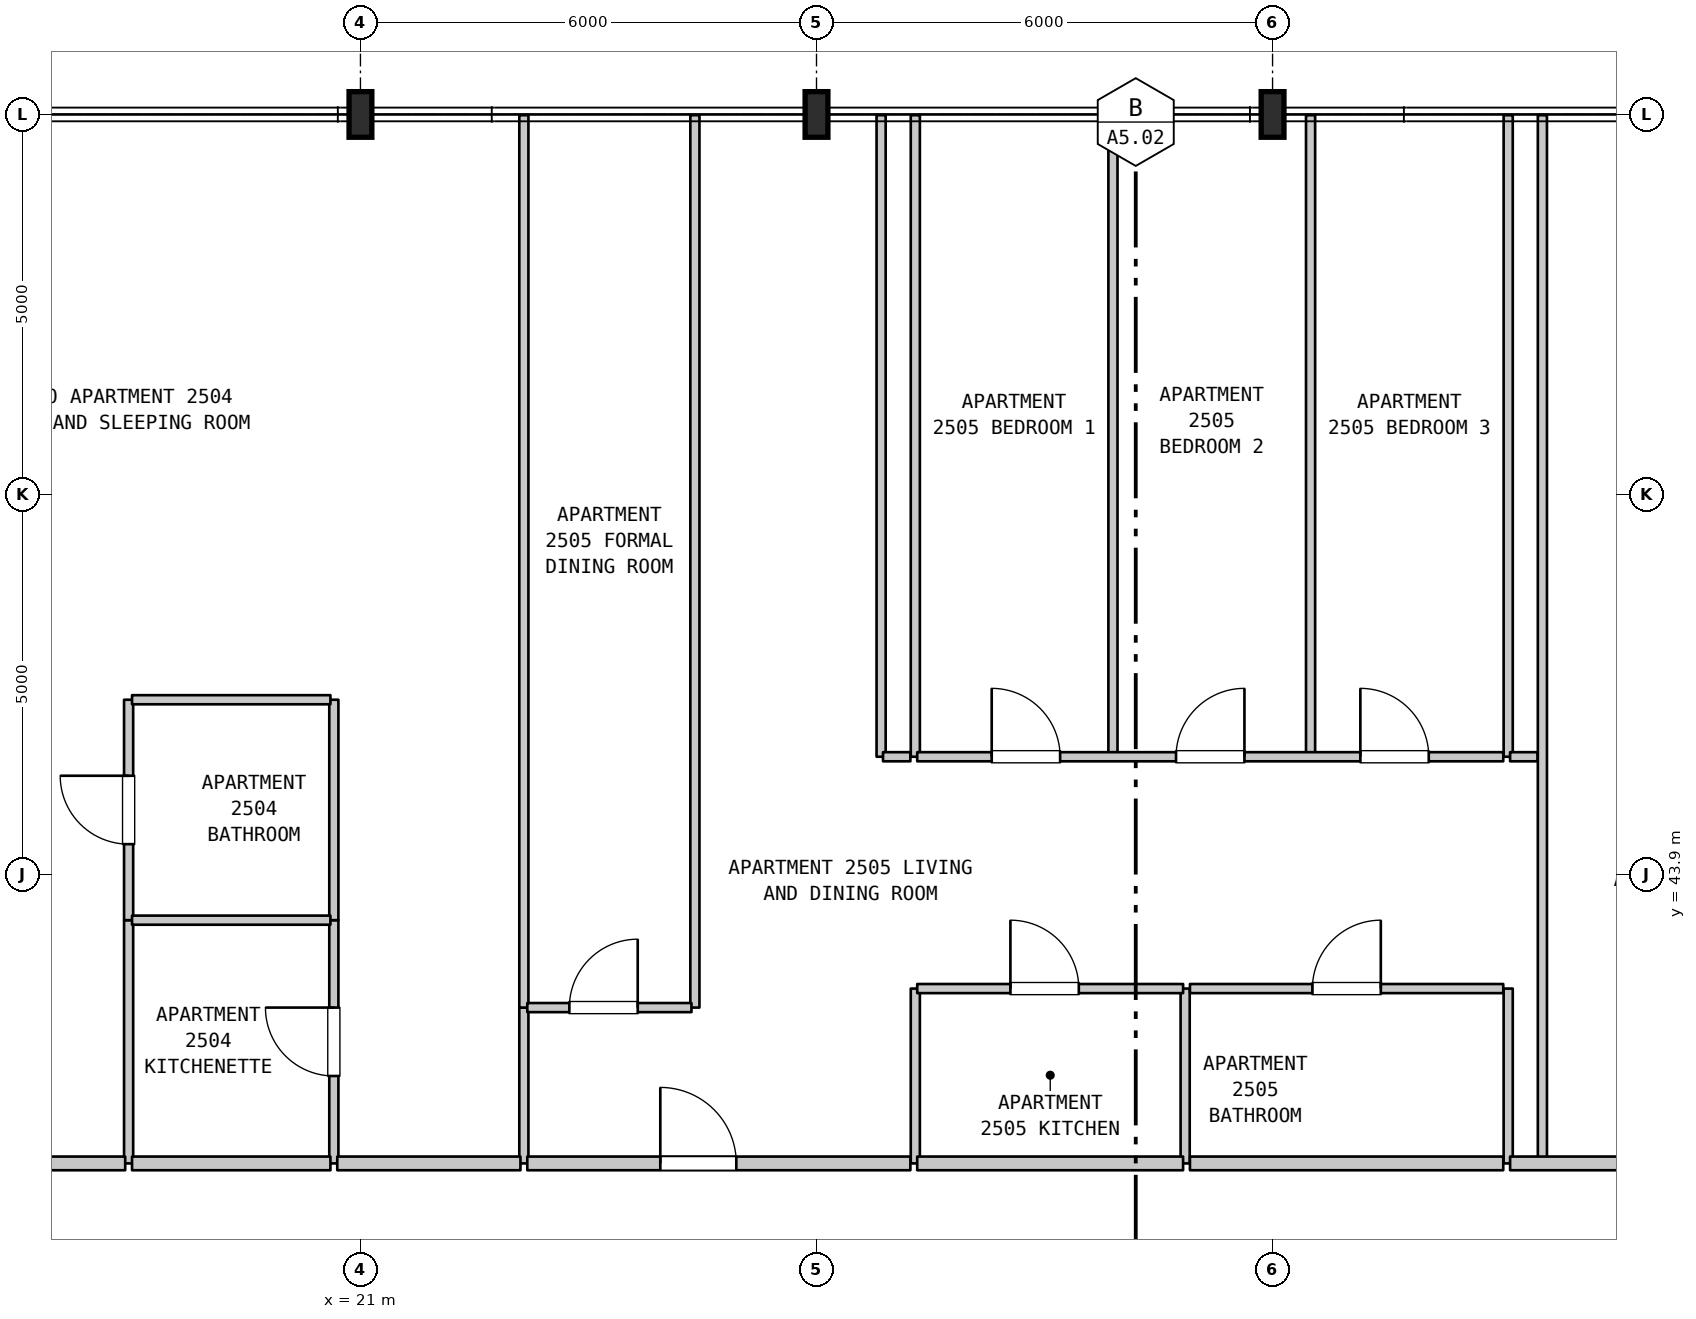
"""IFC4 building model, lengths in metres.
Left out: names, types, materials, properties, quantities, classifications, styles, units other than length and angle.
Written with IfcOpenShell. Run it as: python <this file> out.ifc"""

import sys

from ifc_helpers import new_model, si_unit, direction, frame, frame_2d, origin, origin_2d, place, context, subcontext, project, spatial, rectangle, i_section, extrude, element, fill, save


model = new_model("IFC4")
c1 = context("Model", 3, precision=1e-05, world=origin(), true_north=direction((0.0, 1.0)))
c2 = subcontext(c1, "Body", "Model", "MODEL_VIEW")
j1 = project(units=[si_unit("LENGTHUNIT", "METRE"), si_unit("PLANEANGLEUNIT", "RADIAN")], contexts=[c1])
p1 = place(None, origin())
s1 = spatial("IfcSite", under=j1, at=p1, CompositionType="ELEMENT")
p2 = place(p1, origin())
s2 = spatial("IfcBuilding", under=s1, at=p2, CompositionType="ELEMENT")
p3 = place(p2, frame((0.0, 0.0, 105.7)))
s3 = spatial("IfcBuildingStorey", under=s2, at=p3, CompositionType="ELEMENT", Elevation=105.7)
for number, where, z_axis, x_axis in (
    (1, (21.0, 53.9, 0.0), (0.0, 0.0, 1.0), (1.0, 0.0, 0.0)),
    (2, (27.0, 53.9, 0.0), (0.0, 0.0, 1.0), (1.0, 0.0, 0.0)),
    (3, (33.0, 53.9, 0.0), (0.0, 0.0, 1.0), (1.0, 0.0, 0.0)),
):
    element("IfcColumn", number, at=place(p3, frame(where, z_axis=z_axis, x_axis=x_axis)), inside=s3, PredefinedType="COLUMN", context=c2, shape_type="SweptSolid", body=[
        extrude(i_section(OverallWidth=0.3, OverallDepth=0.6, WebThickness=0.015, FlangeThickness=0.03, FilletRadius=0.027, at=origin_2d()), origin(), (0.0, 0.0, 1.0), 3.7),
    ])
p4 = place(p3, frame((17.95, 40.1, 0.0), z_axis=(0.0, 0.0, 1.0), x_axis=(0.0, 1.0, 0.0)))
e4 = element("IfcWall", 4, at=p4, inside=s3, PredefinedType="PARTITIONING", context=c2, shape_type="SweptSolid", body=[
    extrude(rectangle(XDim=3.2, YDim=0.12, at=frame_2d((1.6, 0.0))), origin(), (0.0, 0.0, 1.0), 3.385),
])
p5 = place(p3, frame((17.95, 43.3, 0.0), z_axis=(0.0, 0.0, 1.0), x_axis=(0.0, 1.0, 0.0)))
e5 = element("IfcWall", 5, at=p5, inside=s3, PredefinedType="PARTITIONING", context=c2, shape_type="SweptSolid", body=[
    extrude(rectangle(XDim=2.9, YDim=0.12, at=frame_2d((1.45, 0.0))), origin(), (0.0, 0.0, 1.0), 3.385),
])
p6 = place(p5, frame((1.0, 0.0, 0.0)))
e6 = element("IfcOpeningElement", 6, at=p6, cuts=e5, PredefinedType="OPENING", context=c2, shape_type="SweptSolid", body=[
    extrude(rectangle(XDim=0.9, YDim=2.1, at=frame_2d((0.45, 1.05))), frame((0.0, 0.07, 0.0), z_axis=(0.0, -1.0, 0.0), x_axis=(1.0, 0.0, 0.0)), (0.0, 0.0, 1.0), 0.14),
])
p7 = place(p3, frame((20.65, 40.1, 0.0), z_axis=(0.0, 0.0, 1.0), x_axis=(0.0, 1.0, 0.0)))
e7 = element("IfcWall", 7, at=p7, inside=s3, PredefinedType="PARTITIONING", context=c2, shape_type="SweptSolid", body=[
    extrude(rectangle(XDim=3.2, YDim=0.12, at=frame_2d((1.6, 0.0))), origin(), (0.0, 0.0, 1.0), 3.385),
])
p8 = place(p7, frame((1.15, 0.0, 0.0)))
e8 = element("IfcOpeningElement", 8, at=p8, cuts=e7, PredefinedType="OPENING", context=c2, shape_type="SweptSolid", body=[
    extrude(rectangle(XDim=0.9, YDim=2.15, at=frame_2d((0.45, 1.075))), frame((0.0, 0.07, 0.0), z_axis=(0.0, -1.0, 0.0), x_axis=(1.0, 0.0, 0.0)), (0.0, 0.0, 1.0), 0.14),
])
p9 = place(p3, frame((20.65, 43.3, 0.0), z_axis=(0.0, 0.0, 1.0), x_axis=(0.0, 1.0, 0.0)))
e9 = element("IfcWall", 9, at=p9, inside=s3, PredefinedType="PARTITIONING", context=c2, shape_type="SweptSolid", body=[
    extrude(rectangle(XDim=2.9, YDim=0.12, at=frame_2d((1.45, 0.0))), origin(), (0.0, 0.0, 1.0), 3.385),
])
p10 = place(p3, frame((23.15, 40.1, 0.0), z_axis=(0.0, 0.0, 1.0), x_axis=(0.0, 1.0, 0.0)))
e10 = element("IfcWall", 10, at=p10, inside=s3, PredefinedType="PARTITIONING", context=c2, shape_type="SweptSolid", body=[
    extrude(rectangle(XDim=2.05, YDim=0.12, at=frame_2d((1.025, 0.0))), origin(), (0.0, 0.0, 1.0), 3.385),
])
for number, where, z_axis, x_axis in (
    (11, (23.15, 42.15, 0.0), (0.0, 0.0, 1.0), (0.0, 1.0, 0.0)),
    (12, (25.4, 42.15, 0.0), (0.0, 0.0, 1.0), (0.0, 1.0, 0.0)),
):
    element("IfcWall", number, at=place(p3, frame(where, z_axis=z_axis, x_axis=x_axis)), inside=s3, PredefinedType="PARTITIONING", context=c2, shape_type="SweptSolid", body=[
        extrude(rectangle(XDim=11.74, YDim=0.12, at=frame_2d((5.87, 0.0))), origin(), (0.0, 0.0, 1.0), 3.385),
    ])
p11 = place(p3, frame((27.85, 45.45, 0.0), z_axis=(0.0, 0.0, 1.0), x_axis=(0.0, 1.0, 0.0)))
e13 = element("IfcWall", 13, at=p11, inside=s3, PredefinedType="PARTITIONING", context=c2, shape_type="SweptSolid", body=[
    extrude(rectangle(XDim=8.44, YDim=0.12, at=frame_2d((4.22, 0.0))), origin(), (0.0, 0.0, 1.0), 3.385),
])
p12 = place(p3, frame((28.3, 40.1, 0.0), z_axis=(0.0, 0.0, 1.0), x_axis=(0.0, 1.0, 0.0)))
e14 = element("IfcWall", 14, at=p12, inside=s3, PredefinedType="PARTITIONING", context=c2, shape_type="SweptSolid", body=[
    extrude(rectangle(XDim=2.3, YDim=0.12, at=frame_2d((1.15, 0.0))), origin(), (0.0, 0.0, 1.0), 3.385),
])
for number, where, z_axis, x_axis in (
    (15, (28.3, 45.45, 0.0), (0.0, 0.0, 1.0), (0.0, 1.0, 0.0)),
    (16, (30.9, 45.45, 0.0), (0.0, 0.0, 1.0), (0.0, 1.0, 0.0)),
):
    element("IfcWall", number, at=place(p3, frame(where, z_axis=z_axis, x_axis=x_axis)), inside=s3, PredefinedType="PARTITIONING", context=c2, shape_type="SweptSolid", body=[
        extrude(rectangle(XDim=8.44, YDim=0.12, at=frame_2d((4.22, 0.0))), origin(), (0.0, 0.0, 1.0), 3.385),
    ])
p13 = place(p3, frame((31.85, 40.1, 0.0), z_axis=(0.0, 0.0, 1.0), x_axis=(0.0, 1.0, 0.0)))
e17 = element("IfcWall", 17, at=p13, inside=s3, PredefinedType="PARTITIONING", context=c2, shape_type="SweptSolid", body=[
    extrude(rectangle(XDim=2.3, YDim=0.12, at=frame_2d((1.15, 0.0))), origin(), (0.0, 0.0, 1.0), 3.385),
])
p14 = place(p3, frame((33.5, 45.45, 0.0), z_axis=(0.0, 0.0, 1.0), x_axis=(0.0, 1.0, 0.0)))
e18 = element("IfcWall", 18, at=p14, inside=s3, PredefinedType="PARTITIONING", context=c2, shape_type="SweptSolid", body=[
    extrude(rectangle(XDim=8.44, YDim=0.12, at=frame_2d((4.22, 0.0))), origin(), (0.0, 0.0, 1.0), 3.385),
])
p15 = place(p3, frame((36.1, 40.1, 0.0), z_axis=(0.0, 0.0, 1.0), x_axis=(0.0, 1.0, 0.0)))
e19 = element("IfcWall", 19, at=p15, inside=s3, PredefinedType="PARTITIONING", context=c2, shape_type="SweptSolid", body=[
    extrude(rectangle(XDim=2.3, YDim=0.12, at=frame_2d((1.15, 0.0))), origin(), (0.0, 0.0, 1.0), 3.385),
])
p16 = place(p3, frame((36.1, 45.45, 0.0), z_axis=(0.0, 0.0, 1.0), x_axis=(0.0, 1.0, 0.0)))
e20 = element("IfcWall", 20, at=p16, inside=s3, PredefinedType="PARTITIONING", context=c2, shape_type="SweptSolid", body=[
    extrude(rectangle(XDim=8.44, YDim=0.12, at=frame_2d((4.22, 0.0))), origin(), (0.0, 0.0, 1.0), 3.385),
])
p17 = place(p3, frame((36.55, 40.1, 0.0), z_axis=(0.0, 0.0, 1.0), x_axis=(0.0, 1.0, 0.0)))
e21 = element("IfcWall", 21, at=p17, inside=s3, PredefinedType="PARTITIONING", context=c2, shape_type="SweptSolid", body=[
    extrude(rectangle(XDim=13.79, YDim=0.12, at=frame_2d((6.895, 0.0))), origin(), (0.0, 0.0, 1.0), 3.385),
])
p18 = place(p3, frame((12.875, 40.1, 0.0), z_axis=(0.0, 0.0, 1.0), x_axis=(1.0, 0.0, 0.0)))
e22 = element("IfcWall", 22, at=p18, inside=s3, PredefinedType="STANDARD", context=c2, shape_type="SweptSolid", body=[
    extrude(rectangle(XDim=5.03, YDim=0.18, at=frame_2d((2.515, 0.0))), origin(), (0.0, 0.0, 1.0), 3.385),
])
p19 = place(p18, frame((2.0, 0.0, 0.0)))
e23 = element("IfcOpeningElement", 23, at=p19, cuts=e22, PredefinedType="OPENING", context=c2, shape_type="SweptSolid", body=[
    extrude(rectangle(XDim=1.0, YDim=2.15, at=frame_2d((0.5, 1.075))), frame((0.0, 0.1, 0.0), z_axis=(0.0, -1.0, 0.0), x_axis=(1.0, 0.0, 0.0)), (0.0, 0.0, 1.0), 0.2),
])
p20 = place(p3, frame((17.995, 40.1, 0.0), z_axis=(0.0, 0.0, 1.0), x_axis=(1.0, 0.0, 0.0)))
e24 = element("IfcWall", 24, at=p20, inside=s3, PredefinedType="STANDARD", context=c2, shape_type="SweptSolid", body=[
    extrude(rectangle(XDim=2.61, YDim=0.18, at=frame_2d((1.305, 0.0))), origin(), (0.0, 0.0, 1.0), 3.385),
])
p21 = place(p3, frame((20.695, 40.1, 0.0), z_axis=(0.0, 0.0, 1.0), x_axis=(1.0, 0.0, 0.0)))
e25 = element("IfcWall", 25, at=p21, inside=s3, PredefinedType="STANDARD", context=c2, shape_type="SweptSolid", body=[
    extrude(rectangle(XDim=2.41, YDim=0.18, at=frame_2d((1.205, 0.0))), origin(), (0.0, 0.0, 1.0), 3.385),
])
p22 = place(p3, frame((23.195, 40.1, 0.0), z_axis=(0.0, 0.0, 1.0), x_axis=(1.0, 0.0, 0.0)))
e26 = element("IfcWall", 26, at=p22, inside=s3, PredefinedType="STANDARD", context=c2, shape_type="SweptSolid", body=[
    extrude(rectangle(XDim=5.04, YDim=0.18, at=frame_2d((2.52, 0.0))), origin(), (0.0, 0.0, 1.0), 3.385),
])
p23 = place(p22, frame((1.75, 0.0, 0.0)))
e27 = element("IfcOpeningElement", 27, at=p23, cuts=e26, PredefinedType="OPENING", context=c2, shape_type="SweptSolid", body=[
    extrude(rectangle(XDim=1.0, YDim=2.15, at=frame_2d((0.5, 1.075))), frame((0.0, 0.1, 0.0), z_axis=(0.0, -1.0, 0.0), x_axis=(1.0, 0.0, 0.0)), (0.0, 0.0, 1.0), 0.2),
])
p24 = place(p3, frame((28.325, 40.1, 0.0), z_axis=(0.0, 0.0, 1.0), x_axis=(1.0, 0.0, 0.0)))
e28 = element("IfcWall", 28, at=p24, inside=s3, PredefinedType="STANDARD", context=c2, shape_type="SweptSolid", body=[
    extrude(rectangle(XDim=3.498, YDim=0.18, at=frame_2d((1.749, 0.0))), origin(), (0.0, 0.0, 1.0), 3.385),
])
p25 = place(p3, frame((31.913, 40.1, 0.0), z_axis=(0.0, 0.0, 1.0), x_axis=(1.0, 0.0, 0.0)))
e29 = element("IfcWall", 29, at=p25, inside=s3, PredefinedType="STANDARD", context=c2, shape_type="SweptSolid", body=[
    extrude(rectangle(XDim=4.122, YDim=0.18, at=frame_2d((2.061, 0.0))), origin(), (0.0, 0.0, 1.0), 3.385),
])
p26 = place(p3, frame((36.125, 40.1, 0.0), z_axis=(0.0, 0.0, 1.0), x_axis=(1.0, 0.0, 0.0)))
e30 = element("IfcWall", 30, at=p26, inside=s3, PredefinedType="STANDARD", context=c2, shape_type="SweptSolid", body=[
    extrude(rectangle(XDim=5.14, YDim=0.18, at=frame_2d((2.57, 0.0))), origin(), (0.0, 0.0, 1.0), 3.385),
])
p27 = place(p26, frame((2.198, 0.0, 0.0)))
e31 = element("IfcOpeningElement", 31, at=p27, cuts=e30, PredefinedType="OPENING", context=c2, shape_type="SweptSolid", body=[
    extrude(rectangle(XDim=1.0, YDim=2.15, at=frame_2d((0.5, 1.075))), frame((0.0, 0.1, 0.0), z_axis=(0.0, -1.0, 0.0), x_axis=(1.0, 0.0, 0.0)), (0.0, 0.0, 1.0), 0.2),
])
p28 = place(p3, frame((23.195, 42.15, 0.0), z_axis=(0.0, 0.0, 1.0), x_axis=(1.0, 0.0, 0.0)))
e32 = element("IfcWall", 32, at=p28, inside=s3, PredefinedType="PARTITIONING", context=c2, shape_type="SweptSolid", body=[
    extrude(rectangle(XDim=2.16, YDim=0.12, at=frame_2d((1.08, 0.0))), origin(), (0.0, 0.0, 1.0), 3.385),
])
p29 = place(p28, frame((0.553, 0.0, 0.0)))
e33 = element("IfcOpeningElement", 33, at=p29, cuts=e32, PredefinedType="OPENING", context=c2, shape_type="SweptSolid", body=[
    extrude(rectangle(XDim=0.9, YDim=2.15, at=frame_2d((0.45, 1.075))), frame((0.0, 0.07, 0.0), z_axis=(0.0, -1.0, 0.0), x_axis=(1.0, 0.0, 0.0)), (0.0, 0.0, 1.0), 0.14),
])
p30 = place(p3, frame((28.325, 42.4, 0.0), z_axis=(0.0, 0.0, 1.0), x_axis=(1.0, 0.0, 0.0)))
e34 = element("IfcWall", 34, at=p30, inside=s3, PredefinedType="PARTITIONING", context=c2, shape_type="SweptSolid", body=[
    extrude(rectangle(XDim=3.498, YDim=0.12, at=frame_2d((1.749, 0.0))), origin(), (0.0, 0.0, 1.0), 3.385),
])
p31 = place(p30, frame((1.226, 0.0, 0.0)))
e35 = element("IfcOpeningElement", 35, at=p31, cuts=e34, PredefinedType="OPENING", context=c2, shape_type="SweptSolid", body=[
    extrude(rectangle(XDim=0.9, YDim=2.15, at=frame_2d((0.45, 1.075))), frame((0.0, 0.07, 0.0), z_axis=(0.0, -1.0, 0.0), x_axis=(1.0, 0.0, 0.0)), (0.0, 0.0, 1.0), 0.14),
])
p32 = place(p3, frame((31.913, 42.4, 0.0), z_axis=(0.0, 0.0, 1.0), x_axis=(1.0, 0.0, 0.0)))
e36 = element("IfcWall", 36, at=p32, inside=s3, PredefinedType="PARTITIONING", context=c2, shape_type="SweptSolid", body=[
    extrude(rectangle(XDim=4.122, YDim=0.12, at=frame_2d((2.061, 0.0))), origin(), (0.0, 0.0, 1.0), 3.385),
])
p33 = place(p32, frame((1.611, 0.0, 0.0)))
e37 = element("IfcOpeningElement", 37, at=p33, cuts=e36, PredefinedType="OPENING", context=c2, shape_type="SweptSolid", body=[
    extrude(rectangle(XDim=0.9, YDim=2.1, at=frame_2d((0.45, 1.05))), frame((0.0, 0.07, 0.0), z_axis=(0.0, -1.0, 0.0), x_axis=(1.0, 0.0, 0.0)), (0.0, 0.0, 1.0), 0.14),
])
p34 = place(p3, frame((17.995, 43.3, 0.0), z_axis=(0.0, 0.0, 1.0), x_axis=(1.0, 0.0, 0.0)))
e38 = element("IfcWall", 38, at=p34, inside=s3, PredefinedType="PARTITIONING", context=c2, shape_type="SweptSolid", body=[
    extrude(rectangle(XDim=2.61, YDim=0.12, at=frame_2d((1.305, 0.0))), origin(), (0.0, 0.0, 1.0), 3.385),
])
p35 = place(p3, frame((27.875, 45.45, 0.0), z_axis=(0.0, 0.0, 1.0), x_axis=(1.0, 0.0, 0.0)))
e39 = element("IfcWall", 39, at=p35, inside=s3, PredefinedType="PARTITIONING", context=c2, shape_type="SweptSolid", body=[
    extrude(rectangle(XDim=0.36, YDim=0.12, at=frame_2d((0.18, 0.0))), origin(), (0.0, 0.0, 1.0), 3.385),
])
p36 = place(p3, frame((28.325, 45.45, 0.0), z_axis=(0.0, 0.0, 1.0), x_axis=(1.0, 0.0, 0.0)))
e40 = element("IfcWall", 40, at=p36, inside=s3, PredefinedType="PARTITIONING", context=c2, shape_type="SweptSolid", body=[
    extrude(rectangle(XDim=7.71, YDim=0.12, at=frame_2d((3.855, 0.0))), origin(), (0.0, 0.0, 1.0), 3.385),
])
p37 = place(p36, frame((0.98, 0.0, 0.0)))
e41 = element("IfcOpeningElement", 41, at=p37, cuts=e40, PredefinedType="OPENING", context=c2, shape_type="SweptSolid", body=[
    extrude(rectangle(XDim=0.9, YDim=2.15, at=frame_2d((0.45, 1.075))), frame((0.0, 0.07, 0.0), z_axis=(0.0, -1.0, 0.0), x_axis=(1.0, 0.0, 0.0)), (0.0, 0.0, 1.0), 0.14),
])
p38 = place(p36, frame((3.405, 0.0, 0.0)))
e42 = element("IfcOpeningElement", 42, at=p38, cuts=e40, PredefinedType="OPENING", context=c2, shape_type="SweptSolid", body=[
    extrude(rectangle(XDim=0.9, YDim=2.15, at=frame_2d((0.45, 1.075))), frame((0.0, 0.07, 0.0), z_axis=(0.0, -1.0, 0.0), x_axis=(1.0, 0.0, 0.0)), (0.0, 0.0, 1.0), 0.14),
])
p39 = place(p36, frame((5.83, 0.0, 0.0)))
e43 = element("IfcOpeningElement", 43, at=p39, cuts=e40, PredefinedType="OPENING", context=c2, shape_type="SweptSolid", body=[
    extrude(rectangle(XDim=0.9, YDim=2.15, at=frame_2d((0.45, 1.075))), frame((0.0, 0.07, 0.0), z_axis=(0.0, -1.0, 0.0), x_axis=(1.0, 0.0, 0.0)), (0.0, 0.0, 1.0), 0.14),
])
p40 = place(p3, frame((36.125, 45.45, 0.0), z_axis=(0.0, 0.0, 1.0), x_axis=(1.0, 0.0, 0.0)))
e44 = element("IfcWall", 44, at=p40, inside=s3, PredefinedType="PARTITIONING", context=c2, shape_type="SweptSolid", body=[
    extrude(rectangle(XDim=0.36, YDim=0.12, at=frame_2d((0.18, 0.0))), origin(), (0.0, 0.0, 1.0), 3.385),
])
p41 = place(p3, frame((17.995, 46.2, 0.0), z_axis=(0.0, 0.0, 1.0), x_axis=(1.0, 0.0, 0.0)))
e45 = element("IfcWall", 45, at=p41, inside=s3, PredefinedType="PARTITIONING", context=c2, shape_type="SweptSolid", body=[
    extrude(rectangle(XDim=2.61, YDim=0.12, at=frame_2d((1.305, 0.0))), origin(), (0.0, 0.0, 1.0), 3.385),
])
p42 = place(p6, origin())
e46 = element("IfcDoor", 46, at=p42, inside=s3, OperationType="SINGLE_SWING_RIGHT", PredefinedType="DOOR", context=c2, shape_type="SweptSolid", body=[
    extrude(rectangle(XDim=0.9, YDim=2.1, at=frame_2d((0.45, 1.05))), frame((0.0, 0.025, 0.0), z_axis=(0.0, -1.0, 0.0), x_axis=(1.0, 0.0, 0.0)), (0.0, 0.0, 1.0), 0.05),
])
fill(e6, e46)
p43 = place(p8, origin())
e47 = element("IfcDoor", 47, at=p43, inside=s3, OperationType="SINGLE_SWING_RIGHT", PredefinedType="DOOR", context=c2, shape_type="SweptSolid", body=[
    extrude(rectangle(XDim=0.9, YDim=2.15, at=frame_2d((0.45, 1.075))), frame((0.0, 0.025, 0.0), z_axis=(0.0, -1.0, 0.0), x_axis=(1.0, 0.0, 0.0)), (0.0, 0.0, 1.0), 0.05),
])
fill(e8, e47)
p44 = place(p23, origin())
e48 = element("IfcDoor", 48, at=p44, inside=s3, OperationType="SINGLE_SWING_LEFT", PredefinedType="DOOR", context=c2, shape_type="SweptSolid", body=[
    extrude(rectangle(XDim=1.0, YDim=2.15, at=frame_2d((0.5, 1.075))), frame((0.0, 0.025, 0.0), z_axis=(0.0, -1.0, 0.0), x_axis=(1.0, 0.0, 0.0)), (0.0, 0.0, 1.0), 0.05),
])
fill(e27, e48)
p45 = place(p29, origin())
e49 = element("IfcDoor", 49, at=p45, inside=s3, OperationType="SINGLE_SWING_RIGHT", PredefinedType="DOOR", context=c2, shape_type="SweptSolid", body=[
    extrude(rectangle(XDim=0.9, YDim=2.15, at=frame_2d((0.45, 1.075))), frame((0.0, 0.025, 0.0), z_axis=(0.0, -1.0, 0.0), x_axis=(1.0, 0.0, 0.0)), (0.0, 0.0, 1.0), 0.05),
])
fill(e33, e49)
p46 = place(p31, origin())
e50 = element("IfcDoor", 50, at=p46, inside=s3, OperationType="SINGLE_SWING_LEFT", PredefinedType="DOOR", context=c2, shape_type="SweptSolid", body=[
    extrude(rectangle(XDim=0.9, YDim=2.15, at=frame_2d((0.45, 1.075))), frame((0.0, 0.025, 0.0), z_axis=(0.0, -1.0, 0.0), x_axis=(1.0, 0.0, 0.0)), (0.0, 0.0, 1.0), 0.05),
])
fill(e35, e50)
p47 = place(p33, origin())
e51 = element("IfcDoor", 51, at=p47, inside=s3, OperationType="SINGLE_SWING_RIGHT", PredefinedType="DOOR", context=c2, shape_type="SweptSolid", body=[
    extrude(rectangle(XDim=0.9, YDim=2.1, at=frame_2d((0.45, 1.05))), frame((0.0, 0.025, 0.0), z_axis=(0.0, -1.0, 0.0), x_axis=(1.0, 0.0, 0.0)), (0.0, 0.0, 1.0), 0.05),
])
fill(e37, e51)
p48 = place(p37, origin())
e52 = element("IfcDoor", 52, at=p48, inside=s3, OperationType="SINGLE_SWING_LEFT", PredefinedType="DOOR", context=c2, shape_type="SweptSolid", body=[
    extrude(rectangle(XDim=0.9, YDim=2.15, at=frame_2d((0.45, 1.075))), frame((0.0, 0.025, 0.0), z_axis=(0.0, -1.0, 0.0), x_axis=(1.0, 0.0, 0.0)), (0.0, 0.0, 1.0), 0.05),
])
fill(e41, e52)
p49 = place(p38, origin())
e53 = element("IfcDoor", 53, at=p49, inside=s3, OperationType="SINGLE_SWING_RIGHT", PredefinedType="DOOR", context=c2, shape_type="SweptSolid", body=[
    extrude(rectangle(XDim=0.9, YDim=2.15, at=frame_2d((0.45, 1.075))), frame((0.0, 0.025, 0.0), z_axis=(0.0, -1.0, 0.0), x_axis=(1.0, 0.0, 0.0)), (0.0, 0.0, 1.0), 0.05),
])
fill(e42, e53)
p50 = place(p39, origin())
e54 = element("IfcDoor", 54, at=p50, inside=s3, OperationType="SINGLE_SWING_LEFT", PredefinedType="DOOR", context=c2, shape_type="SweptSolid", body=[
    extrude(rectangle(XDim=0.9, YDim=2.15, at=frame_2d((0.45, 1.075))), frame((0.0, 0.025, 0.0), z_axis=(0.0, -1.0, 0.0), x_axis=(1.0, 0.0, 0.0)), (0.0, 0.0, 1.0), 0.05),
])
fill(e43, e54)
save(model, sys.argv[1])
